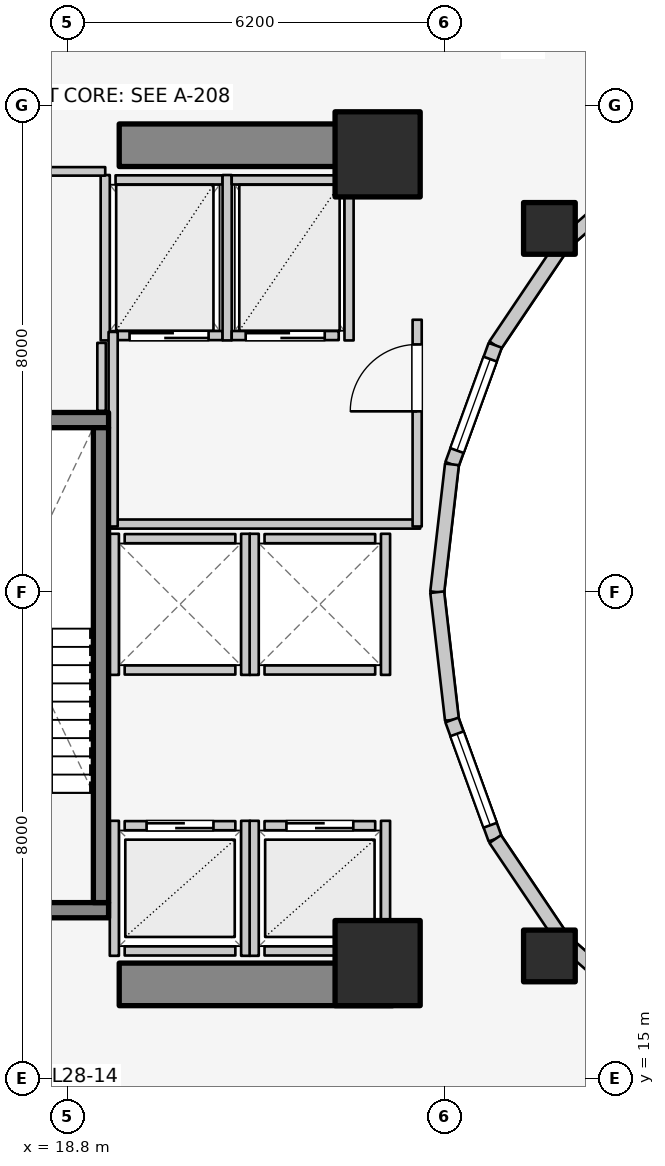
"""IFC4 building model, lengths in metres.
Left out: names, types, materials, properties, quantities, classifications, styles, units other than length and angle.
Written with IfcOpenShell. Run it as: python <this file> out.ifc"""

import sys

from ifc_helpers import new_model, si_unit, direction, frame, frame_2d, origin, origin_2d, place, context, subcontext, project, spatial, rectangle, extrude, element, fill, save


model = new_model("IFC4")
c1 = context("Model", 3, precision=1e-05, world=origin(), true_north=direction((0.0, 1.0)))
c2 = subcontext(c1, "Body", "Model", "MODEL_VIEW")
j1 = project(units=[si_unit("LENGTHUNIT", "METRE"), si_unit("PLANEANGLEUNIT", "RADIAN")], contexts=[c1])
p1 = place(None, origin())
s1 = spatial("IfcSite", under=j1, at=p1, CompositionType="ELEMENT")
p2 = place(p1, origin())
s2 = spatial("IfcBuilding", under=s1, at=p2, CompositionType="ELEMENT")
p3 = place(p2, frame((0.0, 0.0, 94.9)))
s3 = spatial("IfcBuildingStorey", under=s2, at=p3, CompositionType="ELEMENT", Elevation=94.9)
for number, where, z_axis, x_axis in (
    (1, (19.65, 16.55, 0.0), (0.0, 0.0, 1.0), (1.0, 0.0, 0.0)),
    (2, (19.65, 30.35, 0.0), (0.0, 0.0, 1.0), (1.0, 0.0, 0.0)),
):
    element("IfcWall", number, at=place(p3, frame(where, z_axis=z_axis, x_axis=x_axis)), inside=s3, PredefinedType="SHEAR", context=c2, shape_type="SweptSolid", body=[
        extrude(rectangle(XDim=4.5, YDim=0.7, at=frame_2d((2.25, 0.0))), origin(), (0.0, 0.0, 1.0), 3.1),
    ])
p4 = place(p3, frame((16.105, 17.77, 0.0), z_axis=(0.0, 0.0, 1.0), x_axis=(1.0, 0.0, 0.0)))
e3 = element("IfcWall", 3, at=p4, inside=s3, PredefinedType="SOLIDWALL", context=c2, shape_type="SweptSolid", body=[
    extrude(rectangle(XDim=3.37, YDim=0.25, at=frame_2d((1.685, 0.0))), origin(), (0.0, 0.0, 1.0), 3.1),
])
p5 = place(p4, frame((1.135, 0.0, 0.0)))
e4 = element("IfcOpeningElement", 4, at=p5, cuts=e3, PredefinedType="OPENING", context=c2, shape_type="SweptSolid", body=[
    extrude(rectangle(XDim=1.1, YDim=2.1, at=frame_2d((0.55, 1.05))), frame((0.0, 0.135, 0.0), z_axis=(0.0, -1.0, 0.0), x_axis=(1.0, 0.0, 0.0)), (0.0, 0.0, 1.0), 0.27),
])
p6 = place(p3, frame((16.105, 25.83, 0.0), z_axis=(0.0, 0.0, 1.0), x_axis=(1.0, 0.0, 0.0)))
e5 = element("IfcWall", 5, at=p6, inside=s3, PredefinedType="SOLIDWALL", context=c2, shape_type="SweptSolid", body=[
    extrude(rectangle(XDim=3.37, YDim=0.25, at=frame_2d((1.685, 0.0))), origin(), (0.0, 0.0, 1.0), 3.1),
])
p7 = place(p3, frame((19.35, 17.895, 0.0), z_axis=(0.0, 0.0, 1.0), x_axis=(0.0, 1.0, 0.0)))
e6 = element("IfcWall", 6, at=p7, inside=s3, PredefinedType="SOLIDWALL", context=c2, shape_type="SweptSolid", body=[
    extrude(rectangle(XDim=7.81, YDim=0.25, at=frame_2d((3.905, 0.0))), origin(), (0.0, 0.0, 1.0), 3.1),
])
for number, where, z_axis, x_axis in (
    (7, (23.9, 16.9, 0.0), (0.0, 0.0, 1.0), (1.0, 0.0, 0.0)),
    (8, (23.9, 30.2, 0.0), (0.0, 0.0, 1.0), (1.0, 0.0, 0.0)),
):
    element("IfcColumn", number, at=place(p3, frame(where, z_axis=z_axis, x_axis=x_axis)), inside=s3, PredefinedType="COLUMN", context=c2, shape_type="SweptSolid", body=[
        extrude(rectangle(XDim=1.4, YDim=1.4, at=origin_2d()), origin(), (0.0, 0.0, 1.0), 3.1),
    ])
for number, where, z_axis, x_axis in (
    (9, (26.725, 28.982, 0.0), (0.0, 0.0, 1.0), (1.0, 0.0, 0.0)),
    (10, (26.725, 17.018, 0.0), (0.0, 0.0, 1.0), (1.0, 0.0, 0.0)),
):
    element("IfcColumn", number, at=place(p3, frame(where, z_axis=z_axis, x_axis=x_axis)), inside=s3, PredefinedType="COLUMN", context=c2, shape_type="SweptSolid", body=[
        extrude(rectangle(XDim=0.85, YDim=0.85, at=origin_2d()), origin(), (0.0, 0.0, 1.0), 3.1),
    ])
p8 = place(p3, frame((28.44, 30.032, 0.0), z_axis=(0.0, 0.0, 1.0), x_axis=(-0.752576694707, -0.658504607869, 0.0)))
e11 = element("IfcWall", 11, at=p8, inside=s3, PredefinedType="STANDARD", context=c2, shape_type="SweptSolid", body=[
    extrude(rectangle(XDim=1.959, YDim=0.23, at=frame_2d((0.98, 0.0))), origin(), (0.0, 0.0, 1.0), 2.16),
])
p9 = place(p3, frame((26.965, 28.742, 0.0), z_axis=(0.0, 0.0, 1.0), x_axis=(-0.558197800898, -0.829707909492, 0.0)))
e12 = element("IfcWall", 12, at=p9, inside=s3, PredefinedType="STANDARD", context=c2, shape_type="SweptSolid", body=[
    extrude(rectangle(XDim=2.027, YDim=0.23, at=frame_2d((1.013, 0.0))), origin(), (0.0, 0.0, 1.0), 2.16),
])
p10 = place(p3, frame((25.834, 27.06, 0.0), z_axis=(0.0, 0.0, 1.0), x_axis=(-0.341423187295, -0.93990968033, 0.0)))
e13 = element("IfcWall", 13, at=p10, inside=s3, PredefinedType="STANDARD", context=c2, shape_type="SweptSolid", body=[
    extrude(rectangle(XDim=2.084, YDim=0.23, at=frame_2d((1.042, 0.0))), origin(), (0.0, 0.0, 1.0), 2.84),
])
p11 = place(p10, frame((0.242, 0.0, 0.85)))
e14 = element("IfcOpeningElement", 14, at=p11, cuts=e13, PredefinedType="OPENING", context=c2, shape_type="SweptSolid", body=[
    extrude(rectangle(XDim=1.6, YDim=1.65, at=frame_2d((0.8, 0.825))), frame((0.0, 0.125, 0.0), z_axis=(0.0, -1.0, 0.0), x_axis=(1.0, 0.0, 0.0)), (0.0, 0.0, 1.0), 0.25),
])
for number, where, z_axis, x_axis in (
    (15, (25.123, 25.102, 0.0), (0.0, 0.0, 1.0), (-0.115, -0.993, 0.0)),
    (16, (24.88, 23.0, 0.0), (0.0, 0.0, 1.0), (0.115, -0.993, 0.0)),
):
    element("IfcWall", number, at=place(p3, frame(where, z_axis=z_axis, x_axis=x_axis)), inside=s3, PredefinedType="STANDARD", context=c2, shape_type="SweptSolid", body=[
        extrude(rectangle(XDim=2.115, YDim=0.23, at=frame_2d((1.058, 0.0))), origin(), (0.0, 0.0, 1.0), 2.84),
    ])
p12 = place(p3, frame((25.123, 20.898, 0.0), z_axis=(0.0, 0.0, 1.0), x_axis=(0.341423187295, -0.93990968033, 0.0)))
e17 = element("IfcWall", 17, at=p12, inside=s3, PredefinedType="STANDARD", context=c2, shape_type="SweptSolid", body=[
    extrude(rectangle(XDim=2.084, YDim=0.23, at=frame_2d((1.042, 0.0))), origin(), (0.0, 0.0, 1.0), 2.84),
])
p13 = place(p12, frame((0.242, 0.0, 0.85)))
e18 = element("IfcOpeningElement", 18, at=p13, cuts=e17, PredefinedType="OPENING", context=c2, shape_type="SweptSolid", body=[
    extrude(rectangle(XDim=1.6, YDim=1.65, at=frame_2d((0.8, 0.825))), frame((0.0, 0.125, 0.0), z_axis=(0.0, -1.0, 0.0), x_axis=(1.0, 0.0, 0.0)), (0.0, 0.0, 1.0), 0.25),
])
p14 = place(p3, frame((25.834, 18.94, 0.0), z_axis=(0.0, 0.0, 1.0), x_axis=(0.558197800898, -0.829707909492, 0.0)))
e19 = element("IfcWall", 19, at=p14, inside=s3, PredefinedType="STANDARD", context=c2, shape_type="SweptSolid", body=[
    extrude(rectangle(XDim=2.027, YDim=0.23, at=frame_2d((1.013, 0.0))), origin(), (0.0, 0.0, 1.0), 2.16),
])
p15 = place(p3, frame((26.965, 17.258, 0.0), z_axis=(0.0, 0.0, 1.0), x_axis=(0.752576694707, -0.658504607869, 0.0)))
e20 = element("IfcWall", 20, at=p15, inside=s3, PredefinedType="STANDARD", context=c2, shape_type="SweptSolid", body=[
    extrude(rectangle(XDim=1.959, YDim=0.23, at=frame_2d((0.98, 0.0))), origin(), (0.0, 0.0, 1.0), 2.16),
])
p16 = place(p3, frame((19.74, 19.16, 0.0), z_axis=(0.0, 0.0, 1.0), x_axis=(1.0, 0.0, 0.0)))
e21 = element("IfcWall", 21, at=p16, inside=s3, PredefinedType="SOLIDWALL", context=c2, shape_type="SweptSolid", body=[
    extrude(rectangle(XDim=1.82, YDim=0.15, at=frame_2d((0.91, 0.0))), origin(), (0.0, 0.0, 1.0), 2.855),
])
p17 = place(p16, frame((0.36, 0.0, 0.0)))
e22 = element("IfcOpeningElement", 22, at=p17, cuts=e21, PredefinedType="OPENING", context=c2, shape_type="SweptSolid", body=[
    extrude(rectangle(XDim=1.1, YDim=2.1, at=frame_2d((0.55, 1.05))), frame((0.0, 0.085, 0.0), z_axis=(0.0, -1.0, 0.0), x_axis=(1.0, 0.0, 0.0)), (0.0, 0.0, 1.0), 0.17),
])
p18 = place(p3, frame((19.74, 17.1, 0.0), z_axis=(0.0, 0.0, 1.0), x_axis=(1.0, 0.0, 0.0)))
e23 = element("IfcWall", 23, at=p18, inside=s3, PredefinedType="SOLIDWALL", context=c2, shape_type="SweptSolid", body=[
    extrude(rectangle(XDim=1.82, YDim=0.15, at=frame_2d((0.91, 0.0))), origin(), (0.0, 0.0, 1.0), 2.855),
])
p19 = place(p3, frame((19.57, 17.02, 0.0), z_axis=(0.0, 0.0, 1.0), x_axis=(0.0, 1.0, 0.0)))
e24 = element("IfcWall", 24, at=p19, inside=s3, PredefinedType="SOLIDWALL", context=c2, shape_type="SweptSolid", body=[
    extrude(rectangle(XDim=2.22, YDim=0.15, at=frame_2d((1.11, 0.0))), origin(), (0.0, 0.0, 1.0), 2.12),
])
p20 = place(p3, frame((21.73, 17.02, 0.0), z_axis=(0.0, 0.0, 1.0), x_axis=(0.0, 1.0, 0.0)))
e25 = element("IfcWall", 25, at=p20, inside=s3, PredefinedType="SOLIDWALL", context=c2, shape_type="SweptSolid", body=[
    extrude(rectangle(XDim=2.22, YDim=0.15, at=frame_2d((1.11, 0.0))), origin(), (0.0, 0.0, 1.0), 2.855),
])
p21 = place(p3, frame((22.04, 19.16, 0.0), z_axis=(0.0, 0.0, 1.0), x_axis=(1.0, 0.0, 0.0)))
e26 = element("IfcWall", 26, at=p21, inside=s3, PredefinedType="SOLIDWALL", context=c2, shape_type="SweptSolid", body=[
    extrude(rectangle(XDim=1.82, YDim=0.15, at=frame_2d((0.91, 0.0))), origin(), (0.0, 0.0, 1.0), 2.12),
])
p22 = place(p21, frame((0.36, 0.0, 0.0)))
e27 = element("IfcOpeningElement", 27, at=p22, cuts=e26, PredefinedType="OPENING", context=c2, shape_type="SweptSolid", body=[
    extrude(rectangle(XDim=1.1, YDim=2.1, at=frame_2d((0.55, 1.05))), frame((0.0, 0.085, 0.0), z_axis=(0.0, -1.0, 0.0), x_axis=(1.0, 0.0, 0.0)), (0.0, 0.0, 1.0), 0.17),
])
p23 = place(p3, frame((22.04, 17.1, 0.0), z_axis=(0.0, 0.0, 1.0), x_axis=(1.0, 0.0, 0.0)))
e28 = element("IfcWall", 28, at=p23, inside=s3, PredefinedType="SOLIDWALL", context=c2, shape_type="SweptSolid", body=[
    extrude(rectangle(XDim=1.82, YDim=0.15, at=frame_2d((0.91, 0.0))), origin(), (0.0, 0.0, 1.0), 2.12),
])
p24 = place(p3, frame((21.87, 17.02, 0.0), z_axis=(0.0, 0.0, 1.0), x_axis=(0.0, 1.0, 0.0)))
e29 = element("IfcWall", 29, at=p24, inside=s3, PredefinedType="SOLIDWALL", context=c2, shape_type="SweptSolid", body=[
    extrude(rectangle(XDim=2.22, YDim=0.15, at=frame_2d((1.11, 0.0))), origin(), (0.0, 0.0, 1.0), 2.855),
])
p25 = place(p3, frame((24.03, 17.02, 0.0), z_axis=(0.0, 0.0, 1.0), x_axis=(0.0, 1.0, 0.0)))
e30 = element("IfcWall", 30, at=p25, inside=s3, PredefinedType="SOLIDWALL", context=c2, shape_type="SweptSolid", body=[
    extrude(rectangle(XDim=2.22, YDim=0.15, at=frame_2d((1.11, 0.0))), origin(), (0.0, 0.0, 1.0), 2.12),
])
for number, where, z_axis, x_axis in (
    (31, (19.74, 21.72, 0.0), (0.0, 0.0, 1.0), (1.0, 0.0, 0.0)),
    (32, (19.74, 23.88, 0.0), (0.0, 0.0, 1.0), (1.0, 0.0, 0.0)),
):
    element("IfcWall", number, at=place(p3, frame(where, z_axis=z_axis, x_axis=x_axis)), inside=s3, PredefinedType="SOLIDWALL", context=c2, shape_type="SweptSolid", body=[
        extrude(rectangle(XDim=1.82, YDim=0.15, at=frame_2d((0.91, 0.0))), origin(), (0.0, 0.0, 1.0), 2.855),
    ])
for number, where, z_axis, x_axis in (
    (33, (19.57, 21.64, 0.0), (0.0, 0.0, 1.0), (0.0, 1.0, 0.0)),
    (34, (21.73, 21.64, 0.0), (0.0, 0.0, 1.0), (0.0, 1.0, 0.0)),
):
    element("IfcWall", number, at=place(p3, frame(where, z_axis=z_axis, x_axis=x_axis)), inside=s3, PredefinedType="SOLIDWALL", context=c2, shape_type="SweptSolid", body=[
        extrude(rectangle(XDim=2.32, YDim=0.15, at=frame_2d((1.16, 0.0))), origin(), (0.0, 0.0, 1.0), 2.855),
    ])
for number, where, z_axis, x_axis in (
    (35, (22.04, 21.72, 0.0), (0.0, 0.0, 1.0), (1.0, 0.0, 0.0)),
    (36, (22.04, 23.88, 0.0), (0.0, 0.0, 1.0), (1.0, 0.0, 0.0)),
):
    element("IfcWall", number, at=place(p3, frame(where, z_axis=z_axis, x_axis=x_axis)), inside=s3, PredefinedType="SOLIDWALL", context=c2, shape_type="SweptSolid", body=[
        extrude(rectangle(XDim=1.82, YDim=0.15, at=frame_2d((0.91, 0.0))), origin(), (0.0, 0.0, 1.0), 2.12),
    ])
p26 = place(p3, frame((21.87, 21.64, 0.0), z_axis=(0.0, 0.0, 1.0), x_axis=(0.0, 1.0, 0.0)))
e37 = element("IfcWall", 37, at=p26, inside=s3, PredefinedType="SOLIDWALL", context=c2, shape_type="SweptSolid", body=[
    extrude(rectangle(XDim=2.32, YDim=0.15, at=frame_2d((1.16, 0.0))), origin(), (0.0, 0.0, 1.0), 2.855),
])
p27 = place(p3, frame((24.03, 21.64, 0.0), z_axis=(0.0, 0.0, 1.0), x_axis=(0.0, 1.0, 0.0)))
e38 = element("IfcWall", 38, at=p27, inside=s3, PredefinedType="SOLIDWALL", context=c2, shape_type="SweptSolid", body=[
    extrude(rectangle(XDim=2.32, YDim=0.15, at=frame_2d((1.16, 0.0))), origin(), (0.0, 0.0, 1.0), 2.12),
])
p28 = place(p3, frame((19.59, 27.22, 0.0), z_axis=(0.0, 0.0, 1.0), x_axis=(1.0, 0.0, 0.0)))
e39 = element("IfcWall", 39, at=p28, inside=s3, PredefinedType="SOLIDWALL", context=c2, shape_type="SweptSolid", body=[
    extrude(rectangle(XDim=1.76, YDim=0.15, at=frame_2d((0.88, 0.0))), origin(), (0.0, 0.0, 1.0), 2.855),
])
p29 = place(p28, frame((0.23, 0.0, 0.0)))
e40 = element("IfcOpeningElement", 40, at=p29, cuts=e39, PredefinedType="OPENING", context=c2, shape_type="SweptSolid", body=[
    extrude(rectangle(XDim=1.3, YDim=2.1, at=frame_2d((0.65, 1.05))), frame((0.0, 0.085, 0.0), z_axis=(0.0, -1.0, 0.0), x_axis=(1.0, 0.0, 0.0)), (0.0, 0.0, 1.0), 0.17),
])
p30 = place(p3, frame((19.59, 29.78, 0.0), z_axis=(0.0, 0.0, 1.0), x_axis=(1.0, 0.0, 0.0)))
e41 = element("IfcWall", 41, at=p30, inside=s3, PredefinedType="SOLIDWALL", context=c2, shape_type="SweptSolid", body=[
    extrude(rectangle(XDim=1.76, YDim=0.15, at=frame_2d((0.88, 0.0))), origin(), (0.0, 0.0, 1.0), 2.855),
])
for number, where, z_axis, x_axis in (
    (42, (19.42, 27.14, 0.0), (0.0, 0.0, 1.0), (0.0, 1.0, 0.0)),
    (43, (21.425, 27.14, 0.0), (0.0, 0.0, 1.0), (0.0, 1.0, 0.0)),
):
    element("IfcWall", number, at=place(p3, frame(where, z_axis=z_axis, x_axis=x_axis)), inside=s3, PredefinedType="SOLIDWALL", context=c2, shape_type="SweptSolid", body=[
        extrude(rectangle(XDim=2.72, YDim=0.15, at=frame_2d((1.36, 0.0))), origin(), (0.0, 0.0, 1.0), 2.855),
    ])
p31 = place(p3, frame((21.5, 27.22, 0.0), z_axis=(0.0, 0.0, 1.0), x_axis=(1.0, 0.0, 0.0)))
e44 = element("IfcWall", 44, at=p31, inside=s3, PredefinedType="SOLIDWALL", context=c2, shape_type="SweptSolid", body=[
    extrude(rectangle(XDim=1.76, YDim=0.15, at=frame_2d((0.88, 0.0))), origin(), (0.0, 0.0, 1.0), 2.855),
])
p32 = place(p31, frame((0.23, 0.0, 0.0)))
e45 = element("IfcOpeningElement", 45, at=p32, cuts=e44, PredefinedType="OPENING", context=c2, shape_type="SweptSolid", body=[
    extrude(rectangle(XDim=1.3, YDim=2.1, at=frame_2d((0.65, 1.05))), frame((0.0, 0.085, 0.0), z_axis=(0.0, -1.0, 0.0), x_axis=(1.0, 0.0, 0.0)), (0.0, 0.0, 1.0), 0.17),
])
p33 = place(p3, frame((21.5, 29.78, 0.0), z_axis=(0.0, 0.0, 1.0), x_axis=(1.0, 0.0, 0.0)))
e46 = element("IfcWall", 46, at=p33, inside=s3, PredefinedType="SOLIDWALL", context=c2, shape_type="SweptSolid", body=[
    extrude(rectangle(XDim=1.76, YDim=0.15, at=frame_2d((0.88, 0.0))), origin(), (0.0, 0.0, 1.0), 2.855),
])
p34 = place(p3, frame((23.43, 27.14, 0.0), z_axis=(0.0, 0.0, 1.0), x_axis=(0.0, 1.0, 0.0)))
e47 = element("IfcWall", 47, at=p34, inside=s3, PredefinedType="SOLIDWALL", context=c2, shape_type="SweptSolid", body=[
    extrude(rectangle(XDim=2.72, YDim=0.15, at=frame_2d((1.36, 0.0))), origin(), (0.0, 0.0, 1.0), 2.855),
])
p35 = place(p3, frame((19.52, 24.12, 0.0), z_axis=(0.0, 0.0, 1.0), x_axis=(1.0, 0.0, 0.0)))
e48 = element("IfcWall", 48, at=p35, inside=s3, PredefinedType="PARTITIONING", context=c2, shape_type="SweptSolid", body=[
    extrude(rectangle(XDim=5.08, YDim=0.15, at=frame_2d((2.54, 0.0))), origin(), (0.0, 0.0, 1.0), 2.12),
])
p36 = place(p3, frame((19.55, 24.08, 0.0), z_axis=(0.0, 0.0, 1.0), x_axis=(0.0, 1.0, 0.0)))
e49 = element("IfcWall", 49, at=p36, inside=s3, PredefinedType="PARTITIONING", context=c2, shape_type="SweptSolid", body=[
    extrude(rectangle(XDim=3.2, YDim=0.15, at=frame_2d((1.6, 0.0))), origin(), (0.0, 0.0, 1.0), 2.855),
])
p37 = place(p3, frame((24.55, 24.08, 0.0), z_axis=(0.0, 0.0, 1.0), x_axis=(0.0, 1.0, 0.0)))
e50 = element("IfcWall", 50, at=p37, inside=s3, PredefinedType="PARTITIONING", context=c2, shape_type="SweptSolid", body=[
    extrude(rectangle(XDim=3.4, YDim=0.15, at=frame_2d((1.7, 0.0))), origin(), (0.0, 0.0, 1.0), 2.855),
])
p38 = place(p37, frame((1.894, 0.0, 0.0)))
e51 = element("IfcOpeningElement", 51, at=p38, cuts=e50, PredefinedType="OPENING", context=c2, shape_type="SweptSolid", body=[
    extrude(rectangle(XDim=1.1, YDim=2.1, at=frame_2d((0.55, 1.05))), frame((0.0, 0.085, 0.0), z_axis=(0.0, -1.0, 0.0), x_axis=(1.0, 0.0, 0.0)), (0.0, 0.0, 1.0), 0.17),
])
p39 = place(p3, frame((16.12, 29.92, 0.0), z_axis=(0.0, 0.0, 1.0), x_axis=(1.0, 0.0, 0.0)))
e52 = element("IfcWall", 52, at=p39, inside=s3, PredefinedType="PLUMBINGWALL", context=c2, shape_type="SweptSolid", body=[
    extrude(rectangle(XDim=3.3, YDim=0.14, at=frame_2d((1.65, 0.0))), origin(), (0.0, 0.0, 1.0), 2.855),
])
p40 = place(p39, frame((1.516, 0.0, 0.0)))
e53 = element("IfcOpeningElement", 53, at=p40, cuts=e52, PredefinedType="OPENING", context=c2, shape_type="SweptSolid", body=[
    extrude(rectangle(XDim=0.85, YDim=2.05, at=frame_2d((0.425, 1.025))), frame((0.0, 0.08, 0.0), z_axis=(0.0, -1.0, 0.0), x_axis=(1.0, 0.0, 0.0)), (0.0, 0.0, 1.0), 0.16),
])
p41 = place(p3, frame((19.36, 25.98, 0.0), z_axis=(0.0, 0.0, 1.0), x_axis=(0.0, 1.0, 0.0)))
e54 = element("IfcWall", 54, at=p41, inside=s3, PredefinedType="PLUMBINGWALL", context=c2, shape_type="SweptSolid", body=[
    extrude(rectangle(XDim=1.12, YDim=0.14, at=frame_2d((0.56, 0.0))), origin(), (0.0, 0.0, 1.0), 2.855),
])
p42 = place(p11, origin())
e55 = element("IfcWindow", 55, at=p42, inside=s3, PartitioningType="SINGLE_PANEL", PredefinedType="WINDOW", context=c2, shape_type="SweptSolid", body=[
    extrude(rectangle(XDim=1.6, YDim=1.65, at=frame_2d((0.8, 0.825))), frame((0.0, 0.03, 0.0), z_axis=(0.0, -1.0, 0.0), x_axis=(1.0, 0.0, 0.0)), (0.0, 0.0, 1.0), 0.06),
])
fill(e14, e55)
p43 = place(p13, origin())
e56 = element("IfcWindow", 56, at=p43, inside=s3, PartitioningType="SINGLE_PANEL", PredefinedType="WINDOW", context=c2, shape_type="SweptSolid", body=[
    extrude(rectangle(XDim=1.6, YDim=1.65, at=frame_2d((0.8, 0.825))), frame((0.0, 0.03, 0.0), z_axis=(0.0, -1.0, 0.0), x_axis=(1.0, 0.0, 0.0)), (0.0, 0.0, 1.0), 0.06),
])
fill(e18, e56)
p44 = place(p17, origin())
e57 = element("IfcDoor", 57, at=p44, inside=s3, OperationType="DOUBLE_DOOR_SLIDING", PredefinedType="DOOR", context=c2, shape_type="SweptSolid", body=[
    extrude(rectangle(XDim=1.1, YDim=2.1, at=frame_2d((0.55, 1.05))), frame((0.0, 0.025, 0.0), z_axis=(0.0, -1.0, 0.0), x_axis=(1.0, 0.0, 0.0)), (0.0, 0.0, 1.0), 0.05),
])
fill(e22, e57)
p45 = place(p22, origin())
e58 = element("IfcDoor", 58, at=p45, inside=s3, OperationType="DOUBLE_DOOR_SLIDING", PredefinedType="DOOR", context=c2, shape_type="SweptSolid", body=[
    extrude(rectangle(XDim=1.1, YDim=2.1, at=frame_2d((0.55, 1.05))), frame((0.0, 0.025, 0.0), z_axis=(0.0, -1.0, 0.0), x_axis=(1.0, 0.0, 0.0)), (0.0, 0.0, 1.0), 0.05),
])
fill(e27, e58)
p46 = place(p29, origin())
e59 = element("IfcDoor", 59, at=p46, inside=s3, OperationType="DOUBLE_DOOR_SLIDING", PredefinedType="DOOR", context=c2, shape_type="SweptSolid", body=[
    extrude(rectangle(XDim=1.3, YDim=2.1, at=frame_2d((0.65, 1.05))), frame((0.0, 0.025, 0.0), z_axis=(0.0, -1.0, 0.0), x_axis=(1.0, 0.0, 0.0)), (0.0, 0.0, 1.0), 0.05),
])
fill(e40, e59)
p47 = place(p32, origin())
e60 = element("IfcDoor", 60, at=p47, inside=s3, OperationType="DOUBLE_DOOR_SLIDING", PredefinedType="DOOR", context=c2, shape_type="SweptSolid", body=[
    extrude(rectangle(XDim=1.3, YDim=2.1, at=frame_2d((0.65, 1.05))), frame((0.0, 0.025, 0.0), z_axis=(0.0, -1.0, 0.0), x_axis=(1.0, 0.0, 0.0)), (0.0, 0.0, 1.0), 0.05),
])
fill(e45, e60)
p48 = place(p38, origin())
e61 = element("IfcDoor", 61, at=p48, inside=s3, OperationType="SINGLE_SWING_LEFT", PredefinedType="DOOR", context=c2, shape_type="SweptSolid", body=[
    extrude(rectangle(XDim=1.1, YDim=2.1, at=frame_2d((0.55, 1.05))), frame((0.0, 0.025, 0.0), z_axis=(0.0, -1.0, 0.0), x_axis=(1.0, 0.0, 0.0)), (0.0, 0.0, 1.0), 0.05),
])
fill(e51, e61)
save(model, sys.argv[1])
